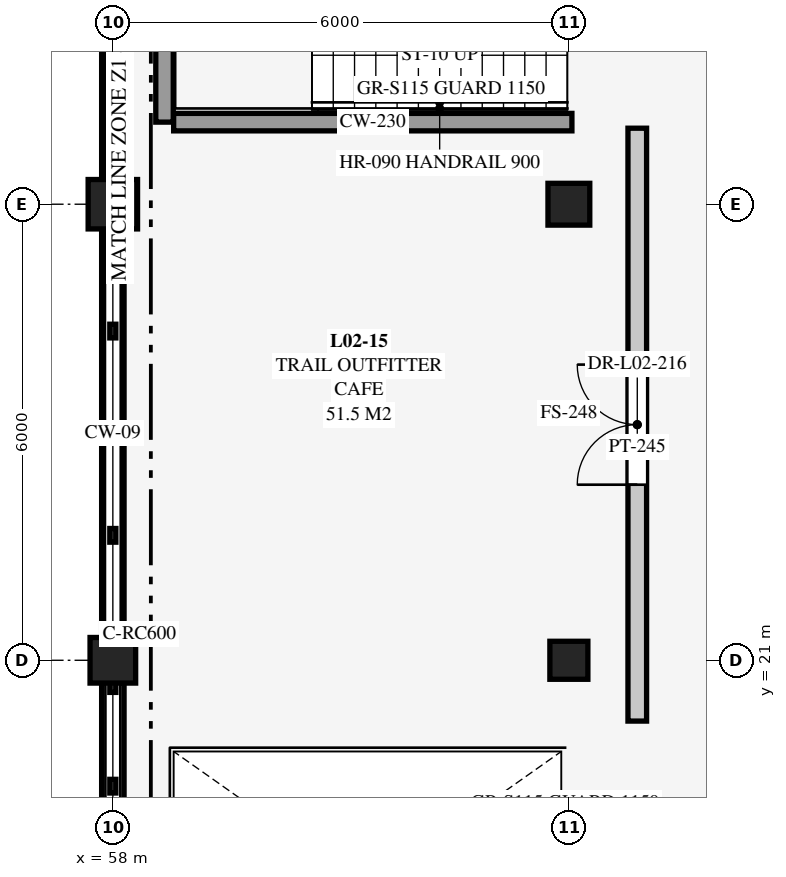
"""IFC4 building model, lengths in metres.
Left out: names, types, materials, properties, quantities, classifications, styles, units other than length and angle.
Written with IfcOpenShell. Run it as: python <this file> out.ifc"""

import sys

from ifc_helpers import new_model, si_unit, direction, frame, frame_2d, origin, origin_2d, place, context, subcontext, project, spatial, rectangle, extrude, element, fill, save


model = new_model("IFC4")
c1 = context("Model", 3, precision=1e-05, world=origin(), true_north=direction((0.0, 1.0)))
c2 = subcontext(c1, "Body", "Model", "MODEL_VIEW")
j1 = project(units=[si_unit("LENGTHUNIT", "METRE"), si_unit("PLANEANGLEUNIT", "RADIAN")], contexts=[c1])
p1 = place(None, origin())
s1 = spatial("IfcSite", under=j1, at=p1, CompositionType="ELEMENT")
p2 = place(p1, origin())
s2 = spatial("IfcBuilding", under=s1, at=p2, CompositionType="ELEMENT")
p3 = place(p2, frame((0.0, 0.0, 4.5)))
s3 = spatial("IfcBuildingStorey", under=s2, at=p3, CompositionType="ELEMENT", Elevation=4.5)
p4 = place(p3, frame((58.0, 21.0, 0.0), z_axis=(0.0, 0.0, 1.0), x_axis=(1.0, 0.0, 0.0)))
e1 = element("IfcColumn", 1, at=p4, inside=s3, PredefinedType="COLUMN", context=c2, shape_type="SweptSolid", body=[
    extrude(rectangle(XDim=0.6, YDim=0.6, at=origin_2d()), origin(), (0.0, 0.0, 1.0), 4.5),
])
p5 = place(p3, frame((58.0, 27.0, 0.0), z_axis=(0.0, 0.0, 1.0), x_axis=(1.0, 0.0, 0.0)))
e2 = element("IfcColumn", 2, at=p5, inside=s3, PredefinedType="COLUMN", context=c2, shape_type="SweptSolid", body=[
    extrude(rectangle(XDim=0.65, YDim=0.65, at=origin_2d()), origin(), (0.0, 0.0, 1.0), 4.5),
])
p6 = place(p3, frame((64.0, 21.0, 0.0), z_axis=(0.0, 0.0, 1.0), x_axis=(1.0, 0.0, 0.0)))
e3 = element("IfcColumn", 3, at=p6, inside=s3, PredefinedType="COLUMN", context=c2, shape_type="SweptSolid", body=[
    extrude(rectangle(XDim=0.5, YDim=0.5, at=origin_2d()), origin(), (0.0, 0.0, 1.0), 4.5),
])
p7 = place(p3, frame((64.0, 27.0, 0.0), z_axis=(0.0, 0.0, 1.0), x_axis=(1.0, 0.0, 0.0)))
e4 = element("IfcColumn", 4, at=p7, inside=s3, PredefinedType="COLUMN", context=c2, shape_type="SweptSolid", body=[
    extrude(rectangle(XDim=0.55, YDim=0.55, at=origin_2d()), origin(), (0.0, 0.0, 1.0), 4.5),
])
p8 = place(p3, frame((58.0, 15.275, 0.0), z_axis=(0.0, 0.0, 1.0), x_axis=(0.0, 1.0, 0.0)))
e5 = element("IfcWall", 5, at=p8, inside=s3, PredefinedType="SOLIDWALL", context=c2, shape_type="SweptSolid", body=[
    extrude(rectangle(XDim=5.425, YDim=0.295, at=frame_2d((2.712, 0.0))), origin(), (0.0, 0.0, 1.0), 0.46),
])
p9 = place(p3, frame((58.0, 21.3, 0.0), z_axis=(0.0, 0.0, 1.0), x_axis=(0.0, 1.0, 0.0)))
e6 = element("IfcWall", 6, at=p9, inside=s3, PredefinedType="SOLIDWALL", context=c2, shape_type="SweptSolid", body=[
    extrude(rectangle(XDim=5.375, YDim=0.295, at=frame_2d((2.688, 0.0))), origin(), (0.0, 0.0, 1.0), 0.16),
])
p10 = place(p3, frame((58.0, 27.325, 0.0), z_axis=(0.0, 0.0, 1.0), x_axis=(0.0, 1.0, 0.0)))
e7 = element("IfcWall", 7, at=p10, inside=s3, PredefinedType="SOLIDWALL", context=c2, shape_type="SweptSolid", body=[
    extrude(rectangle(XDim=5.425, YDim=0.295, at=frame_2d((2.712, 0.0))), origin(), (0.0, 0.0, 1.0), 0.21),
])
p11 = place(p3, frame((58.68, 28.08, 0.0), z_axis=(0.0, 0.0, 1.0), x_axis=(0.0, 1.0, 0.0)))
e8 = element("IfcWall", 8, at=p11, inside=s3, PredefinedType="SHEAR", context=c2, shape_type="SweptSolid", body=[
    extrude(rectangle(XDim=3.84, YDim=0.23, at=frame_2d((1.92, 0.0))), origin(), (0.0, 0.0, 1.0), 4.24),
])
p12 = place(p3, frame((58.8, 28.08, 0.0), z_axis=(0.0, 0.0, 1.0), x_axis=(1.0, 0.0, 0.0)))
e9 = element("IfcWall", 9, at=p12, inside=s3, PredefinedType="SHEAR", context=c2, shape_type="SweptSolid", body=[
    extrude(rectangle(XDim=5.24, YDim=0.23, at=frame_2d((2.62, 0.0))), origin(), (0.0, 0.0, 1.0), 4.24),
])
p13 = place(p3, frame((64.9, 20.2, 0.0), z_axis=(0.0, 0.0, 1.0), x_axis=(0.0, 1.0, 0.0)))
e10 = element("IfcWall", 10, at=p13, inside=s3, PredefinedType="PARTITIONING", context=c2, shape_type="SweptSolid", body=[
    extrude(rectangle(XDim=7.8, YDim=0.245, at=frame_2d((3.9, 0.0))), origin(), (0.0, 0.0, 1.0), 4.24),
])
p14 = place(p13, frame((3.11, 0.0, 0.0)))
e11 = element("IfcOpeningElement", 11, at=p14, cuts=e10, PredefinedType="OPENING", context=c2, shape_type="SweptSolid", body=[
    extrude(rectangle(XDim=1.58, YDim=2.2, at=frame_2d((0.79, 1.1))), frame((0.0, 0.133, 0.0), z_axis=(0.0, -1.0, 0.0), x_axis=(1.0, 0.0, 0.0)), (0.0, 0.0, 1.0), 0.265),
])
p15 = place(p14, origin())
e12 = element("IfcDoor", 12, at=p15, inside=s3, OperationType="DOUBLE_DOOR_SINGLE_SWING", PredefinedType="DOOR", context=c2, shape_type="SweptSolid", body=[
    extrude(rectangle(XDim=1.58, YDim=2.2, at=frame_2d((0.79, 1.1))), frame((0.0, 0.025, 0.0), z_axis=(0.0, -1.0, 0.0), x_axis=(1.0, 0.0, 0.0)), (0.0, 0.0, 1.0), 0.05),
])
fill(e11, e12)
save(model, sys.argv[1])
